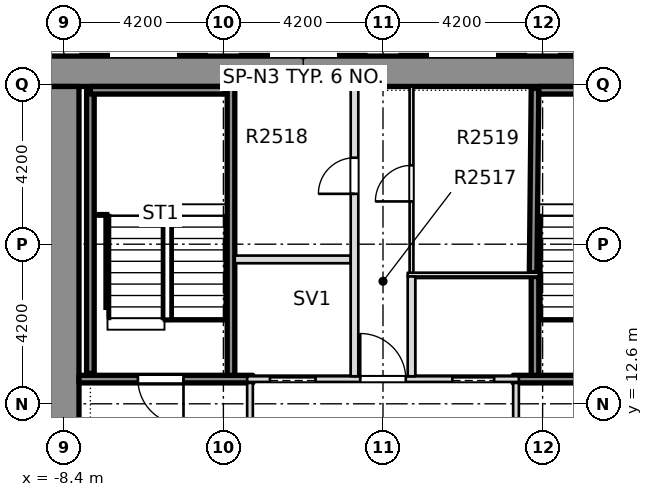
"""IFC4 building model, lengths in metres.
Left out: names, types, materials, properties, quantities, classifications, styles, units other than length and angle.
Written with IfcOpenShell. Run it as: python <this file> out.ifc"""

import sys

from ifc_helpers import new_model, si_unit, direction, frame, frame_2d, origin, place, context, subcontext, project, spatial, rectangle, extrude, element, fill, save


model = new_model("IFC4")
c1 = context("Model", 3, precision=1e-05, world=origin(), true_north=direction((0.0, 1.0)))
c2 = subcontext(c1, "Body", "Model", "MODEL_VIEW")
j1 = project(units=[si_unit("LENGTHUNIT", "METRE"), si_unit("PLANEANGLEUNIT", "RADIAN")], contexts=[c1])
p1 = place(None, origin())
s1 = spatial("IfcSite", under=j1, at=p1, CompositionType="ELEMENT")
p2 = place(p1, origin())
s2 = spatial("IfcBuilding", under=s1, at=p2, CompositionType="ELEMENT")
p3 = place(p2, frame((0.0, 0.0, 101.1)))
s3 = spatial("IfcBuildingStorey", under=s2, at=p3, CompositionType="ELEMENT", Elevation=101.1)
p4 = place(p3, frame((-11.8, 21.35, -0.32), z_axis=(0.0, 0.0, 1.0), x_axis=(1.0, 0.0, 0.0)))
e1 = element("IfcWall", 1, at=p4, inside=s3, PredefinedType="SHEAR", context=c2, shape_type="SweptSolid", body=[
    extrude(rectangle(XDim=23.6, YDim=0.8, at=frame_2d((11.8, 0.0))), origin(), (0.0, 0.0, 1.0), 3.45),
])
p5 = place(p3, frame((-8.4, -7.6, -0.32), z_axis=(0.0, 0.0, 1.0), x_axis=(0.0, 1.0, 0.0)))
e2 = element("IfcWall", 2, at=p5, inside=s3, PredefinedType="SHEAR", context=c2, shape_type="SweptSolid", body=[
    extrude(rectangle(XDim=28.55, YDim=0.8, at=frame_2d((14.275, 0.0))), origin(), (0.0, 0.0, 1.0), 3.45),
])
p6 = place(p5, frame((18.5, 0.0, 0.32)))
e3 = element("IfcOpeningElement", 3, at=p6, cuts=e2, PredefinedType="OPENING", context=c2, shape_type="SweptSolid", body=[
    extrude(rectangle(XDim=1.2, YDim=2.1, at=frame_2d((0.6, 1.05))), frame((0.0, 0.41, 0.0), z_axis=(0.0, -1.0, 0.0), x_axis=(1.0, 0.0, 0.0)), (0.0, 0.0, 1.0), 0.82),
])
p7 = place(p3, frame((-7.999, 13.25, 0.0), z_axis=(0.0, 0.0, 1.0), x_axis=(1.0, 0.0, 0.0)))
e4 = element("IfcWall", 4, at=p7, inside=s3, PredefinedType="SOLIDWALL", context=c2, shape_type="SweptSolid", body=[
    extrude(rectangle(XDim=4.574, YDim=0.2, at=frame_2d((2.287, 0.0))), origin(), (0.0, 0.0, 1.0), 3.13),
])
p8 = place(p7, frame((1.549, 0.0, 0.0)))
e5 = element("IfcOpeningElement", 5, at=p8, cuts=e4, PredefinedType="OPENING", context=c2, shape_type="SweptSolid", body=[
    extrude(rectangle(XDim=1.2, YDim=2.1, at=frame_2d((0.6, 1.05))), frame((0.0, 0.11, 0.0), z_axis=(0.0, -1.0, 0.0), x_axis=(1.0, 0.0, 0.0)), (0.0, 0.0, 1.0), 0.22),
])
p9 = place(p3, frame((-3.575, 13.25, 0.0), z_axis=(0.0, 0.0, 1.0), x_axis=(1.0, 0.0, 0.0)))
e6 = element("IfcWall", 6, at=p9, inside=s3, PredefinedType="PARTITIONING", context=c2, shape_type="SweptSolid", body=[
    extrude(rectangle(XDim=7.15, YDim=0.15, at=frame_2d((3.575, 0.0))), origin(), (0.0, 0.0, 1.0), 3.13),
])
p10 = place(p9, frame((0.6, 0.0, 0.0)))
e7 = element("IfcOpeningElement", 7, at=p10, cuts=e6, PredefinedType="OPENING", context=c2, shape_type="SweptSolid", body=[
    extrude(rectangle(XDim=1.2, YDim=2.1, at=frame_2d((0.6, 1.05))), frame((0.0, 0.085, 0.0), z_axis=(0.0, -1.0, 0.0), x_axis=(1.0, 0.0, 0.0)), (0.0, 0.0, 1.0), 0.17),
])
p11 = place(p9, frame((5.4, 0.0, 0.0)))
e8 = element("IfcOpeningElement", 8, at=p11, cuts=e6, PredefinedType="OPENING", context=c2, shape_type="SweptSolid", body=[
    extrude(rectangle(XDim=1.1, YDim=2.1, at=frame_2d((0.55, 1.05))), frame((0.0, 0.085, 0.0), z_axis=(0.0, -1.0, 0.0), x_axis=(1.0, 0.0, 0.0)), (0.0, 0.0, 1.0), 0.17),
])
p12 = place(p9, frame((2.975, 0.0, 0.0)))
e9 = element("IfcOpeningElement", 9, at=p12, cuts=e6, PredefinedType="OPENING", context=c2, shape_type="SweptSolid", body=[
    extrude(rectangle(XDim=1.2, YDim=2.1, at=frame_2d((0.6, 1.05))), frame((0.0, 0.085, 0.0), z_axis=(0.0, -1.0, 0.0), x_axis=(1.0, 0.0, 0.0)), (0.0, 0.0, 1.0), 0.17),
])
p13 = place(p3, frame((3.425, 13.25, 0.0), z_axis=(0.0, 0.0, 1.0), x_axis=(1.0, 0.0, 0.0)))
e10 = element("IfcWall", 10, at=p13, inside=s3, PredefinedType="SOLIDWALL", context=c2, shape_type="SweptSolid", body=[
    extrude(rectangle(XDim=4.574, YDim=0.2, at=frame_2d((2.287, 0.0))), origin(), (0.0, 0.0, 1.0), 3.13),
])
p14 = place(p13, frame((1.825, 0.0, 0.0)))
e11 = element("IfcOpeningElement", 11, at=p14, cuts=e10, PredefinedType="OPENING", context=c2, shape_type="SweptSolid", body=[
    extrude(rectangle(XDim=1.2, YDim=2.1, at=frame_2d((0.6, 1.05))), frame((0.0, 0.11, 0.0), z_axis=(0.0, -1.0, 0.0), x_axis=(1.0, 0.0, 0.0)), (0.0, 0.0, 1.0), 0.22),
])
p15 = place(p3, frame((0.65, 16.0, 0.0), z_axis=(0.0, 0.0, 1.0), x_axis=(1.0, 0.0, 0.0)))
e12 = element("IfcWall", 12, at=p15, inside=s3, PredefinedType="PARTITIONING", context=c2, shape_type="SweptSolid", body=[
    extrude(rectangle(XDim=3.45, YDim=0.1, at=frame_2d((1.725, 0.0))), origin(), (0.0, 0.0, 1.0), 3.13),
])
p16 = place(p3, frame((-3.9, 16.4, 0.0), z_axis=(0.0, 0.0, 1.0), x_axis=(1.0, 0.0, 0.0)))
e13 = element("IfcWall", 13, at=p16, inside=s3, PredefinedType="PARTITIONING", context=c2, shape_type="SweptSolid", body=[
    extrude(rectangle(XDim=3.05, YDim=0.2, at=frame_2d((1.525, 0.0))), origin(), (0.0, 0.0, 1.0), 3.13),
])
p17 = place(p3, frame((-4.0, 13.35, 0.0), z_axis=(0.0, 0.0, 1.0), x_axis=(0.0, 1.0, 0.0)))
e14 = element("IfcWall", 14, at=p17, inside=s3, PredefinedType="SOLIDWALL", context=c2, shape_type="SweptSolid", body=[
    extrude(rectangle(XDim=7.599, YDim=0.2, at=frame_2d((3.799, 0.0))), origin(), (0.0, 0.0, 1.0), 3.13),
])
p18 = place(p3, frame((-3.5, 10.075, 0.0), z_axis=(0.0, 0.0, 1.0), x_axis=(0.0, 1.0, 0.0)))
e15 = element("IfcWall", 15, at=p18, inside=s3, PredefinedType="PARTITIONING", context=c2, shape_type="SweptSolid", body=[
    extrude(rectangle(XDim=3.075, YDim=0.15, at=frame_2d((1.538, 0.0))), origin(), (0.0, 0.0, 1.0), 3.13),
])
p19 = place(p18, frame((0.925, 0.0, 0.0)))
e16 = element("IfcOpeningElement", 16, at=p19, cuts=e15, PredefinedType="OPENING", context=c2, shape_type="SweptSolid", body=[
    extrude(rectangle(XDim=1.2, YDim=2.1, at=frame_2d((0.6, 1.05))), frame((0.0, 0.085, 0.0), z_axis=(0.0, -1.0, 0.0), x_axis=(1.0, 0.0, 0.0)), (0.0, 0.0, 1.0), 0.17),
])
p20 = place(p3, frame((-0.75, 13.325, 0.0), z_axis=(0.0, 0.0, 1.0), x_axis=(0.0, 1.0, 0.0)))
e17 = element("IfcWall", 17, at=p20, inside=s3, PredefinedType="PARTITIONING", context=c2, shape_type="SweptSolid", body=[
    extrude(rectangle(XDim=7.624, YDim=0.2, at=frame_2d((3.812, 0.0))), origin(), (0.0, 0.0, 1.0), 3.13),
])
p21 = place(p20, frame((4.8, 0.0, 0.0)))
e18 = element("IfcOpeningElement", 18, at=p21, cuts=e17, PredefinedType="OPENING", context=c2, shape_type="SweptSolid", body=[
    extrude(rectangle(XDim=0.95, YDim=2.1, at=frame_2d((0.475, 1.05))), frame((0.0, 0.11, 0.0), z_axis=(0.0, -1.0, 0.0), x_axis=(1.0, 0.0, 0.0)), (0.0, 0.0, 1.0), 0.22),
])
p22 = place(p3, frame((0.75, 13.325, 0.0), z_axis=(0.0, 0.0, 1.0), x_axis=(0.0, 1.0, 0.0)))
e19 = element("IfcWall", 19, at=p22, inside=s3, PredefinedType="PARTITIONING", context=c2, shape_type="SweptSolid", body=[
    extrude(rectangle(XDim=2.625, YDim=0.2, at=frame_2d((1.312, 0.0))), origin(), (0.0, 0.0, 1.0), 3.13),
])
p23 = place(p3, frame((0.75, 16.05, 0.0), z_axis=(0.0, 0.0, 1.0), x_axis=(0.0, 1.0, 0.0)))
e20 = element("IfcWall", 20, at=p23, inside=s3, PredefinedType="PARTITIONING", context=c2, shape_type="SweptSolid", body=[
    extrude(rectangle(XDim=4.899, YDim=0.1, at=frame_2d((2.449, 0.0))), origin(), (0.0, 0.0, 1.0), 3.13),
])
p24 = place(p23, frame((1.875, 0.0, 0.0)))
e21 = element("IfcOpeningElement", 21, at=p24, cuts=e20, PredefinedType="OPENING", context=c2, shape_type="SweptSolid", body=[
    extrude(rectangle(XDim=0.95, YDim=2.1, at=frame_2d((0.475, 1.05))), frame((0.0, 0.06, 0.0), z_axis=(0.0, -1.0, 0.0), x_axis=(1.0, 0.0, 0.0)), (0.0, 0.0, 1.0), 0.12),
])
p25 = place(p3, frame((3.5, 10.075, 0.0), z_axis=(0.0, 0.0, 1.0), x_axis=(0.0, 1.0, 0.0)))
e22 = element("IfcWall", 22, at=p25, inside=s3, PredefinedType="PARTITIONING", context=c2, shape_type="SweptSolid", body=[
    extrude(rectangle(XDim=3.075, YDim=0.15, at=frame_2d((1.538, 0.0))), origin(), (0.0, 0.0, 1.0), 3.13),
])
p26 = place(p25, frame((0.925, 0.0, 0.0)))
e23 = element("IfcOpeningElement", 23, at=p26, cuts=e22, PredefinedType="OPENING", context=c2, shape_type="SweptSolid", body=[
    extrude(rectangle(XDim=1.2, YDim=2.1, at=frame_2d((0.6, 1.05))), frame((0.0, 0.085, 0.0), z_axis=(0.0, -1.0, 0.0), x_axis=(1.0, 0.0, 0.0)), (0.0, 0.0, 1.0), 0.17),
])
p27 = place(p3, frame((4.0, 13.35, 0.0), z_axis=(0.0, 0.0, 1.0), x_axis=(0.0, 1.0, 0.0)))
e24 = element("IfcWall", 24, at=p27, inside=s3, PredefinedType="SOLIDWALL", context=c2, shape_type="SweptSolid", body=[
    extrude(rectangle(XDim=2.6, YDim=0.2, at=frame_2d((1.3, 0.0))), origin(), (0.0, 0.0, 1.0), 3.13),
])
p28 = place(p3, frame((3.95, 16.05, 0.0), z_axis=(0.0, 0.0, 1.0), x_axis=(0.01032118628, 0.999946735138, 0.0)))
e25 = element("IfcWall", 25, at=p28, inside=s3, PredefinedType="SOLIDWALL", context=c2, shape_type="SweptSolid", body=[
    extrude(rectangle(XDim=4.849, YDim=0.2, at=frame_2d((2.425, 0.0))), origin(), (0.0, 0.0, 1.0), 3.13),
])
p29 = place(p3, frame((-7.7, 13.4, 0.0), z_axis=(0.0, 0.0, 1.0), x_axis=(0.0, 1.0, 0.0)))
e26 = element("IfcWall", 26, at=p29, inside=s3, PredefinedType="SOLIDWALL", context=c2, shape_type="SweptSolid", body=[
    extrude(rectangle(XDim=7.45, YDim=0.2, at=frame_2d((3.725, 0.0))), origin(), (0.0, 0.0, 1.0), 3.13),
])
p30 = place(p3, frame((-7.7, 20.85, 0.0), z_axis=(0.0, 0.0, 1.0), x_axis=(1.0, 0.0, 0.0)))
e27 = element("IfcWall", 27, at=p30, inside=s3, PredefinedType="SOLIDWALL", context=c2, shape_type="SweptSolid", body=[
    extrude(rectangle(XDim=3.55, YDim=0.2, at=frame_2d((1.775, 0.0))), origin(), (0.0, 0.0, 1.0), 3.13),
])
p31 = place(p3, frame((4.1, 20.85, 0.0), z_axis=(0.0, 0.0, 1.0), x_axis=(1.0, 0.0, 0.0)))
e28 = element("IfcWall", 28, at=p31, inside=s3, PredefinedType="SOLIDWALL", context=c2, shape_type="SweptSolid", body=[
    extrude(rectangle(XDim=3.6, YDim=0.2, at=frame_2d((1.8, 0.0))), origin(), (0.0, 0.0, 1.0), 3.13),
])
p32 = place(p8, origin())
e29 = element("IfcDoor", 29, at=p32, inside=s3, OperationType="SINGLE_SWING_LEFT", PredefinedType="DOOR", context=c2, shape_type="SweptSolid", body=[
    extrude(rectangle(XDim=1.2, YDim=2.1, at=frame_2d((0.6, 1.05))), frame((0.0, 0.025, 0.0), z_axis=(0.0, -1.0, 0.0), x_axis=(1.0, 0.0, 0.0)), (0.0, 0.0, 1.0), 0.05),
])
fill(e5, e29)
p33 = place(p10, origin())
e30 = element("IfcDoor", 30, at=p33, inside=s3, OperationType="SLIDING_TO_RIGHT", PredefinedType="DOOR", context=c2, shape_type="SweptSolid", body=[
    extrude(rectangle(XDim=1.2, YDim=2.1, at=frame_2d((0.6, 1.05))), frame((0.0, 0.025, 0.0), z_axis=(0.0, -1.0, 0.0), x_axis=(1.0, 0.0, 0.0)), (0.0, 0.0, 1.0), 0.05),
])
fill(e7, e30)
p34 = place(p11, origin())
e31 = element("IfcDoor", 31, at=p34, inside=s3, OperationType="SLIDING_TO_LEFT", PredefinedType="DOOR", context=c2, shape_type="SweptSolid", body=[
    extrude(rectangle(XDim=1.1, YDim=2.1, at=frame_2d((0.55, 1.05))), frame((0.0, 0.025, 0.0), z_axis=(0.0, -1.0, 0.0), x_axis=(1.0, 0.0, 0.0)), (0.0, 0.0, 1.0), 0.05),
])
fill(e8, e31)
p35 = place(p12, origin())
e32 = element("IfcDoor", 32, at=p35, inside=s3, OperationType="SINGLE_SWING_RIGHT", PredefinedType="DOOR", context=c2, shape_type="SweptSolid", body=[
    extrude(rectangle(XDim=1.2, YDim=2.1, at=frame_2d((0.6, 1.05))), frame((0.0, 0.025, 0.0), z_axis=(0.0, -1.0, 0.0), x_axis=(1.0, 0.0, 0.0)), (0.0, 0.0, 1.0), 0.05),
])
fill(e9, e32)
p36 = place(p21, origin())
e33 = element("IfcDoor", 33, at=p36, inside=s3, OperationType="SINGLE_SWING_RIGHT", PredefinedType="DOOR", context=c2, shape_type="SweptSolid", body=[
    extrude(rectangle(XDim=0.95, YDim=2.1, at=frame_2d((0.475, 1.05))), frame((0.0, 0.025, 0.0), z_axis=(0.0, -1.0, 0.0), x_axis=(1.0, 0.0, 0.0)), (0.0, 0.0, 1.0), 0.05),
])
fill(e18, e33)
p37 = place(p24, origin())
e34 = element("IfcDoor", 34, at=p37, inside=s3, OperationType="SINGLE_SWING_LEFT", PredefinedType="DOOR", context=c2, shape_type="SweptSolid", body=[
    extrude(rectangle(XDim=0.95, YDim=2.1, at=frame_2d((0.475, 1.05))), frame((0.0, 0.025, 0.0), z_axis=(0.0, -1.0, 0.0), x_axis=(1.0, 0.0, 0.0)), (0.0, 0.0, 1.0), 0.05),
])
fill(e21, e34)
save(model, sys.argv[1])
